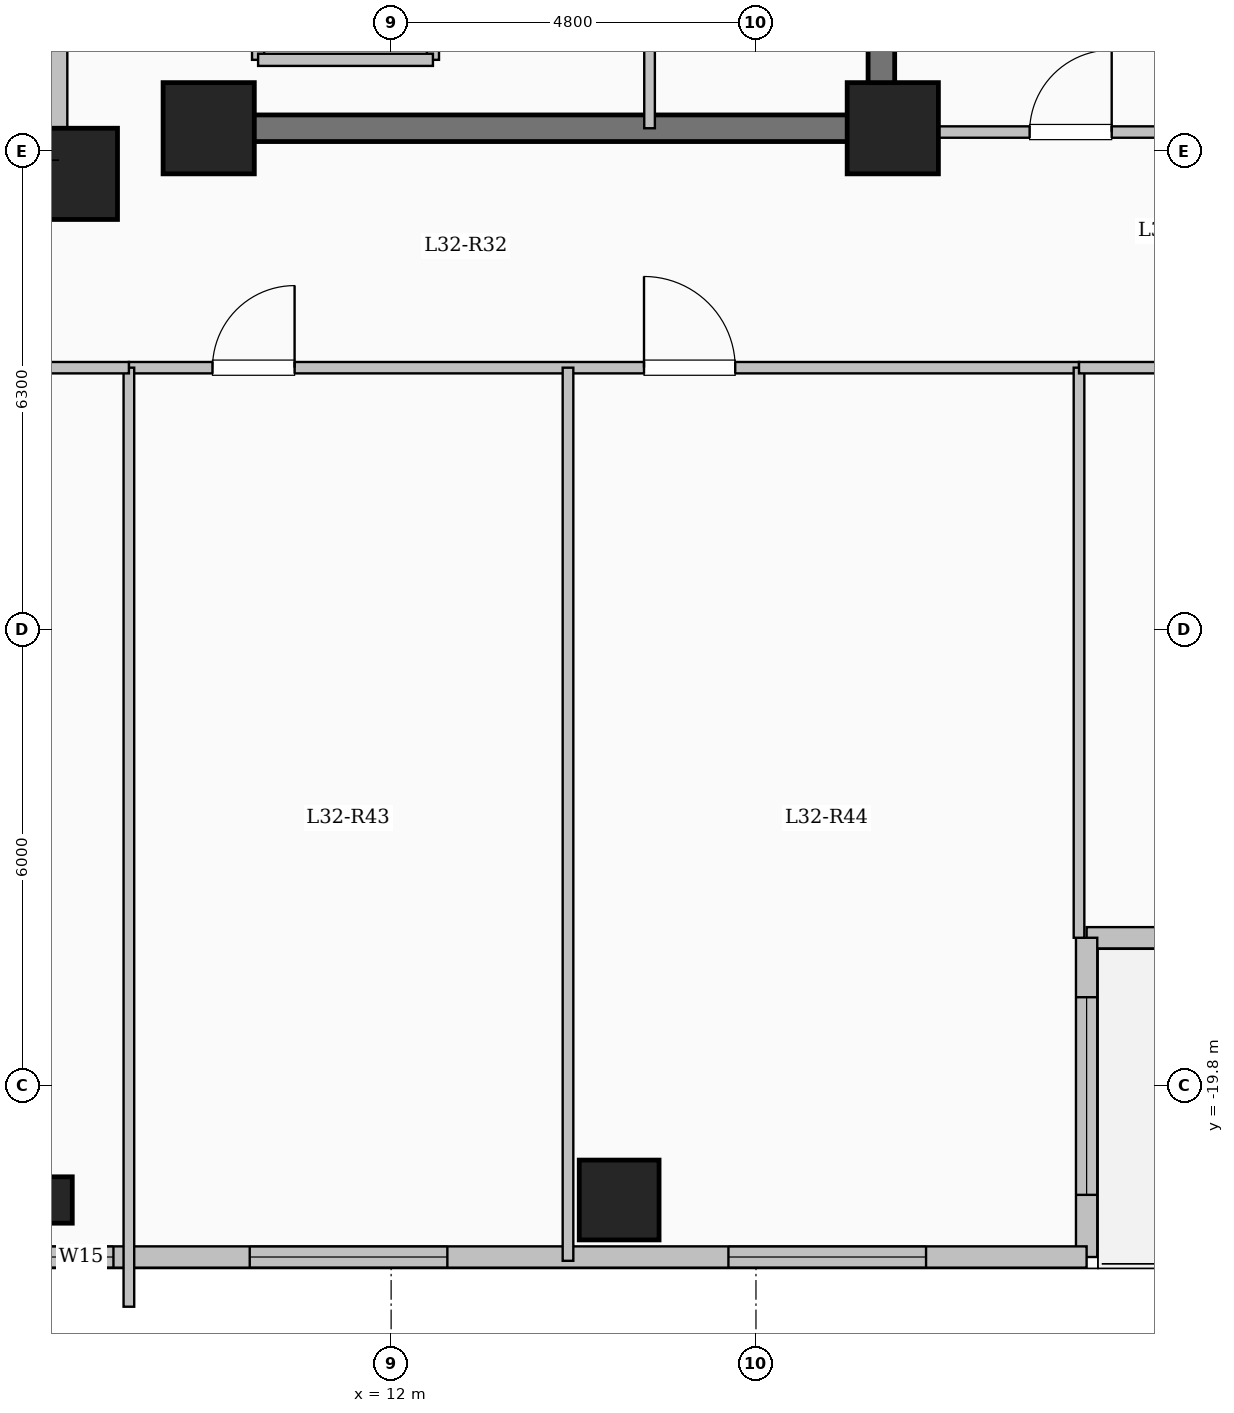
"""IFC4 building model, lengths in metres.
Left out: names, types, materials, properties, quantities, classifications, styles, units other than length and angle.
Written with IfcOpenShell. Run it as: python <this file> out.ifc"""

import sys

from ifc_helpers import new_model, si_unit, direction, frame, frame_2d, origin, origin_2d, place, context, subcontext, project, spatial, rectangle, hollow_circle, extrude, element, fill, save


model = new_model("IFC4")
c1 = context("Model", 3, precision=1e-05, world=origin(), true_north=direction((0.0, 1.0)))
c2 = subcontext(c1, "Body", "Model", "MODEL_VIEW")
j1 = project(units=[si_unit("LENGTHUNIT", "METRE"), si_unit("PLANEANGLEUNIT", "RADIAN")], contexts=[c1])
p1 = place(None, origin())
s1 = spatial("IfcSite", under=j1, at=p1, CompositionType="ELEMENT")
p2 = place(p1, origin())
s2 = spatial("IfcBuilding", under=s1, at=p2, CompositionType="ELEMENT")
p3 = place(p2, frame((0.0, 0.0, 118.5)))
s3 = spatial("IfcBuildingStorey", under=s2, at=p3, CompositionType="ELEMENT", Elevation=118.5)
for number, where, z_axis, x_axis in (
    (1, (7.8, -7.8, 0.0), (0.0, 0.0, 1.0), (1.0, 0.0, 0.0)),
    (2, (9.6, -7.2, 0.0), (0.0, 0.0, 1.0), (1.0, 0.0, 0.0)),
    (3, (18.6, -7.2, 0.0), (0.0, 0.0, 1.0), (1.0, 0.0, 0.0)),
):
    element("IfcColumn", number, at=place(p3, frame(where, z_axis=z_axis, x_axis=x_axis)), inside=s3, PredefinedType="COLUMN", context=c2, shape_type="SweptSolid", body=[
        extrude(rectangle(XDim=1.2, YDim=1.2, at=origin_2d()), origin(), (0.0, 0.0, 1.0), 4.5),
    ])
p4 = place(p3, frame((7.5, -21.3, 0.0), z_axis=(0.0, 0.0, 1.0), x_axis=(1.0, 0.0, 0.0)))
e4 = element("IfcColumn", 4, at=p4, inside=s3, PredefinedType="COLUMN", context=c2, shape_type="SweptSolid", body=[
    extrude(hollow_circle(Radius=0.305, WallThickness=0.025, at=origin_2d()), origin(), (0.0, 0.0, 1.0), 4.5),
])
p5 = place(p3, frame((15.0, -21.3, 0.0), z_axis=(0.0, 0.0, 1.0), x_axis=(1.0, 0.0, 0.0)))
e5 = element("IfcColumn", 5, at=p5, inside=s3, PredefinedType="COLUMN", context=c2, shape_type="SweptSolid", body=[
    extrude(rectangle(XDim=1.05, YDim=1.05, at=origin_2d()), origin(), (0.0, 0.0, 1.0), 4.5),
])
p6 = place(p3, frame((7.62, -7.62, 0.0), z_axis=(0.0, 0.0, 1.0), x_axis=(0.0, 1.0, 0.0)))
e6 = element("IfcWall", 6, at=p6, inside=s3, PredefinedType="SOLIDWALL", context=c2, shape_type="SweptSolid", body=[
    extrude(rectangle(XDim=15.24, YDim=0.24, at=frame_2d((7.62, 0.0))), origin(), (0.0, 0.0, 1.0), 4.2),
])
p7 = place(p6, frame((6.92, 0.0, 0.95)))
e7 = element("IfcOpeningElement", 7, at=p7, cuts=e6, PredefinedType="OPENING", context=c2, shape_type="SweptSolid", body=[
    extrude(rectangle(XDim=1.4, YDim=1.5, at=frame_2d((0.7, 0.75))), frame((0.0, 0.13, 0.0), z_axis=(0.0, -1.0, 0.0), x_axis=(1.0, 0.0, 0.0)), (0.0, 0.0, 1.0), 0.26),
])
p8 = place(p3, frame((26.85, -17.85, 0.0), z_axis=(0.0, 0.0, 1.0), x_axis=(-1.0, 0.0, 0.0)))
e8 = element("IfcWall", 8, at=p8, inside=s3, PredefinedType="SOLIDWALL", context=c2, shape_type="SweptSolid", body=[
    extrude(rectangle(XDim=5.7, YDim=0.28, at=frame_2d((2.85, 0.0))), origin(), (0.0, 0.0, 1.0), 4.2),
])
p9 = place(p8, frame((2.5, 0.0, 0.0)))
e9 = element("IfcOpeningElement", 9, at=p9, cuts=e8, PredefinedType="OPENING", context=c2, shape_type="SweptSolid", body=[
    extrude(rectangle(XDim=1.1, YDim=2.2, at=frame_2d((0.55, 1.1))), frame((0.0, 0.15, 0.0), z_axis=(0.0, -1.0, 0.0), x_axis=(1.0, 0.0, 0.0)), (0.0, 0.0, 1.0), 0.3),
])
p10 = place(p8, frame((0.755, 0.0, 0.95)))
e10 = element("IfcOpeningElement", 10, at=p10, cuts=e8, PredefinedType="OPENING", context=c2, shape_type="SweptSolid", body=[
    extrude(rectangle(XDim=1.2, YDim=1.5, at=frame_2d((0.6, 0.75))), frame((0.0, 0.15, 0.0), z_axis=(0.0, -1.0, 0.0), x_axis=(1.0, 0.0, 0.0)), (0.0, 0.0, 1.0), 0.3),
])
p11 = place(p3, frame((21.15, -17.85, 0.0), z_axis=(0.0, 0.0, 1.0), x_axis=(0.0, -1.0, 0.0)))
e11 = element("IfcWall", 11, at=p11, inside=s3, PredefinedType="SOLIDWALL", context=c2, shape_type="SweptSolid", body=[
    extrude(rectangle(XDim=4.2, YDim=0.28, at=frame_2d((2.1, 0.0))), origin(), (0.0, 0.0, 1.0), 4.2),
])
p12 = place(p11, frame((0.782, 0.0, 0.85)))
e12 = element("IfcOpeningElement", 12, at=p12, cuts=e11, PredefinedType="OPENING", context=c2, shape_type="SweptSolid", body=[
    extrude(rectangle(XDim=2.6, YDim=2.4, at=frame_2d((1.3, 1.2))), frame((0.0, 0.15, 0.0), z_axis=(0.0, -1.0, 0.0), x_axis=(1.0, 0.0, 0.0)), (0.0, 0.0, 1.0), 0.3),
])
p13 = place(p3, frame((21.15, -22.05, 0.0), z_axis=(0.0, 0.0, 1.0), x_axis=(-1.0, 0.0, 0.0)))
e13 = element("IfcWall", 13, at=p13, inside=s3, PredefinedType="SOLIDWALL", context=c2, shape_type="SweptSolid", body=[
    extrude(rectangle(XDim=13.8, YDim=0.28, at=frame_2d((6.9, 0.0))), origin(), (0.0, 0.0, 1.0), 4.2),
])
p14 = place(p13, frame((2.112, 0.0, 0.85)))
e14 = element("IfcOpeningElement", 14, at=p14, cuts=e13, PredefinedType="OPENING", context=c2, shape_type="SweptSolid", body=[
    extrude(rectangle(XDim=2.6, YDim=2.4, at=frame_2d((1.3, 1.2))), frame((0.0, 0.15, 0.0), z_axis=(0.0, -1.0, 0.0), x_axis=(1.0, 0.0, 0.0)), (0.0, 0.0, 1.0), 0.3),
])
p15 = place(p13, frame((8.41, 0.0, 0.85)))
e15 = element("IfcOpeningElement", 15, at=p15, cuts=e13, PredefinedType="OPENING", context=c2, shape_type="SweptSolid", body=[
    extrude(rectangle(XDim=2.6, YDim=2.4, at=frame_2d((1.3, 1.2))), frame((0.0, 0.15, 0.0), z_axis=(0.0, -1.0, 0.0), x_axis=(1.0, 0.0, 0.0)), (0.0, 0.0, 1.0), 0.3),
])
p16 = place(p13, frame((12.803, 0.0, 0.95)))
e16 = element("IfcOpeningElement", 16, at=p16, cuts=e13, PredefinedType="OPENING", context=c2, shape_type="SweptSolid", body=[
    extrude(rectangle(XDim=0.85, YDim=1.5, at=frame_2d((0.425, 0.75))), frame((0.0, 0.15, 0.0), z_axis=(0.0, -1.0, 0.0), x_axis=(1.0, 0.0, 0.0)), (0.0, 0.0, 1.0), 0.3),
])
p17 = place(p3, frame((10.25, -6.3, 0.0), z_axis=(0.0, 0.0, 1.0), x_axis=(0.0, 1.0, 0.0)))
e17 = element("IfcWall", 17, at=p17, inside=s3, PredefinedType="SOLIDWALL", context=c2, shape_type="SweptSolid", body=[
    extrude(rectangle(XDim=2.6, YDim=0.16, at=frame_2d((1.3, 0.0))), origin(), (0.0, 0.0, 1.0), 4.2),
])
p18 = place(p17, frame((0.75, 0.0, 0.0)))
e18 = element("IfcOpeningElement", 18, at=p18, cuts=e17, PredefinedType="OPENING", context=c2, shape_type="SweptSolid", body=[
    extrude(rectangle(XDim=1.1, YDim=2.15, at=frame_2d((0.55, 1.075))), frame((0.0, 0.09, 0.0), z_axis=(0.0, -1.0, 0.0), x_axis=(1.0, 0.0, 0.0)), (0.0, 0.0, 1.0), 0.18),
])
p19 = place(p3, frame((12.55, -6.3, 0.0), z_axis=(0.0, 0.0, 1.0), x_axis=(0.0, 1.0, 0.0)))
e19 = element("IfcWall", 19, at=p19, inside=s3, PredefinedType="SOLIDWALL", context=c2, shape_type="SweptSolid", body=[
    extrude(rectangle(XDim=2.6, YDim=0.16, at=frame_2d((1.3, 0.0))), origin(), (0.0, 0.0, 1.0), 4.2),
])
p20 = place(p3, frame((10.25, -6.3, 0.0), z_axis=(0.0, 0.0, 1.0), x_axis=(1.0, 0.0, 0.0)))
e20 = element("IfcWall", 20, at=p20, inside=s3, PredefinedType="SOLIDWALL", context=c2, shape_type="SweptSolid", body=[
    extrude(rectangle(XDim=2.3, YDim=0.16, at=frame_2d((1.15, 0.0))), origin(), (0.0, 0.0, 1.0), 4.2),
])
p21 = place(p3, frame((18.45, -7.375, 0.0), z_axis=(0.0, 0.0, 1.0), x_axis=(0.0, 1.0, 0.0)))
e21 = element("IfcWall", 21, at=p21, inside=s3, PredefinedType="SHEAR", context=c2, shape_type="SweptSolid", body=[
    extrude(rectangle(XDim=14.05, YDim=0.35, at=frame_2d((7.025, 0.0))), origin(), (0.0, 0.0, 1.0), 4.5),
])
p22 = place(p3, frame((10.075, -7.2, 0.0), z_axis=(0.0, 0.0, 1.0), x_axis=(1.0, 0.0, 0.0)))
e22 = element("IfcWall", 22, at=p22, inside=s3, PredefinedType="SHEAR", context=c2, shape_type="SweptSolid", body=[
    extrude(rectangle(XDim=8.55, YDim=0.35, at=frame_2d((4.275, 0.0))), origin(), (0.0, 0.0, 1.0), 4.5),
])
p23 = place(p3, frame((15.4, -7.2, 0.0), z_axis=(0.0, 0.0, 1.0), x_axis=(0.0, 1.0, 0.0)))
e23 = element("IfcWall", 23, at=p23, inside=s3, PredefinedType="PARTITIONING", context=c2, shape_type="SweptSolid", body=[
    extrude(rectangle(XDim=10.45, YDim=0.14, at=frame_2d((5.225, 0.0))), origin(), (0.0, 0.0, 1.0), 4.2),
])
p24 = place(p23, frame((9.25, 0.0, 0.0)))
e24 = element("IfcOpeningElement", 24, at=p24, cuts=e23, PredefinedType="OPENING", context=c2, shape_type="SweptSolid", body=[
    extrude(rectangle(XDim=0.9, YDim=2.08, at=frame_2d((0.45, 1.04))), frame((0.0, 0.08, 0.0), z_axis=(0.0, -1.0, 0.0), x_axis=(1.0, 0.0, 0.0)), (0.0, 0.0, 1.0), 0.16),
])
p25 = place(p3, frame((8.55, -10.35, 0.0), z_axis=(0.0, 0.0, 1.0), x_axis=(1.0, 0.0, 0.0)))
e25 = element("IfcWall", 25, at=p25, inside=s3, PredefinedType="PARTITIONING", context=c2, shape_type="SweptSolid", body=[
    extrude(rectangle(XDim=12.5, YDim=0.15, at=frame_2d((6.25, 0.0))), origin(), (0.0, 0.0, 1.0), 4.2),
])
p26 = place(p25, frame((1.1, 0.0, 0.0)))
e26 = element("IfcOpeningElement", 26, at=p26, cuts=e25, PredefinedType="OPENING", context=c2, shape_type="SweptSolid", body=[
    extrude(rectangle(XDim=1.08, YDim=2.15, at=frame_2d((0.54, 1.075))), frame((0.0, 0.085, 0.0), z_axis=(0.0, -1.0, 0.0), x_axis=(1.0, 0.0, 0.0)), (0.0, 0.0, 1.0), 0.17),
])
p27 = place(p25, frame((6.777, 0.0, 0.0)))
e27 = element("IfcOpeningElement", 27, at=p27, cuts=e25, PredefinedType="OPENING", context=c2, shape_type="SweptSolid", body=[
    extrude(rectangle(XDim=1.2, YDim=2.15, at=frame_2d((0.6, 1.075))), frame((0.0, 0.085, 0.0), z_axis=(0.0, -1.0, 0.0), x_axis=(1.0, 0.0, 0.0)), (0.0, 0.0, 1.0), 0.17),
])
p28 = place(p3, frame((8.55, -22.704, 0.0), z_axis=(0.0, 0.0, 1.0), x_axis=(0.0, 1.0, 0.0)))
e28 = element("IfcWall", 28, at=p28, inside=s3, PredefinedType="PARTITIONING", context=c2, shape_type="SweptSolid", body=[
    extrude(rectangle(XDim=12.354, YDim=0.14, at=frame_2d((6.177, 0.0))), origin(), (0.0, 0.0, 1.0), 4.2),
])
p29 = place(p3, frame((14.327, -22.1, 0.0), z_axis=(0.0, 0.0, 1.0), x_axis=(0.0, 1.0, 0.0)))
e29 = element("IfcWall", 29, at=p29, inside=s3, PredefinedType="PARTITIONING", context=c2, shape_type="SweptSolid", body=[
    extrude(rectangle(XDim=11.75, YDim=0.14, at=frame_2d((5.875, 0.0))), origin(), (0.0, 0.0, 1.0), 4.2),
])
p30 = place(p3, frame((-8.55, -10.35, 0.0), z_axis=(0.0, 0.0, 1.0), x_axis=(1.0, 0.0, 0.0)))
e30 = element("IfcWall", 30, at=p30, inside=s3, PredefinedType="PARTITIONING", context=c2, shape_type="SweptSolid", body=[
    extrude(rectangle(XDim=17.1, YDim=0.15, at=frame_2d((8.55, 0.0))), origin(), (0.0, 0.0, 1.0), 4.2),
])
p31 = place(p30, frame((1.4, 0.0, 0.0)))
e31 = element("IfcOpeningElement", 31, at=p31, cuts=e30, PredefinedType="OPENING", context=c2, shape_type="SweptSolid", body=[
    extrude(rectangle(XDim=1.2, YDim=2.15, at=frame_2d((0.6, 1.075))), frame((0.0, 0.085, 0.0), z_axis=(0.0, -1.0, 0.0), x_axis=(1.0, 0.0, 0.0)), (0.0, 0.0, 1.0), 0.17),
])
p32 = place(p3, frame((18.45, -7.25, 0.0), z_axis=(0.0, 0.0, 1.0), x_axis=(1.0, 0.0, 0.0)))
e32 = element("IfcWall", 32, at=p32, inside=s3, PredefinedType="PARTITIONING", context=c2, shape_type="SweptSolid", body=[
    extrude(rectangle(XDim=8.43, YDim=0.15, at=frame_2d((4.215, 0.0))), origin(), (0.0, 0.0, 1.0), 4.2),
])
p33 = place(p32, frame((1.95, 0.0, 0.0)))
e33 = element("IfcOpeningElement", 33, at=p33, cuts=e32, PredefinedType="OPENING", context=c2, shape_type="SweptSolid", body=[
    extrude(rectangle(XDim=1.08, YDim=2.15, at=frame_2d((0.54, 1.075))), frame((0.0, 0.085, 0.0), z_axis=(0.0, -1.0, 0.0), x_axis=(1.0, 0.0, 0.0)), (0.0, 0.0, 1.0), 0.17),
])
p34 = place(p3, frame((21.05, -17.85, 0.0), z_axis=(0.0, 0.0, 1.0), x_axis=(0.0, 1.0, 0.0)))
e34 = element("IfcWall", 34, at=p34, inside=s3, PredefinedType="PARTITIONING", context=c2, shape_type="SweptSolid", body=[
    extrude(rectangle(XDim=7.5, YDim=0.14, at=frame_2d((3.75, 0.0))), origin(), (0.0, 0.0, 1.0), 4.2),
])
p35 = place(p3, frame((21.05, -10.35, 0.0), z_axis=(0.0, 0.0, 1.0), x_axis=(1.0, 0.0, 0.0)))
e35 = element("IfcWall", 35, at=p35, inside=s3, PredefinedType="PARTITIONING", context=c2, shape_type="SweptSolid", body=[
    extrude(rectangle(XDim=5.83, YDim=0.15, at=frame_2d((2.915, 0.0))), origin(), (0.0, 0.0, 1.0), 4.2),
])
p36 = place(p35, frame((2.44, 0.0, 0.0)))
e36 = element("IfcOpeningElement", 36, at=p36, cuts=e35, PredefinedType="OPENING", context=c2, shape_type="SweptSolid", body=[
    extrude(rectangle(XDim=0.95, YDim=2.15, at=frame_2d((0.475, 1.075))), frame((0.0, 0.085, 0.0), z_axis=(0.0, -1.0, 0.0), x_axis=(1.0, 0.0, 0.0)), (0.0, 0.0, 1.0), 0.17),
])
p37 = place(p12, origin())
e37 = element("IfcWindow", 37, at=p37, inside=s3, PartitioningType="SINGLE_PANEL", PredefinedType="WINDOW", context=c2, shape_type="SweptSolid", body=[
    extrude(rectangle(XDim=2.6, YDim=2.4, at=frame_2d((1.3, 1.2))), frame((0.0, 0.03, 0.0), z_axis=(0.0, -1.0, 0.0), x_axis=(1.0, 0.0, 0.0)), (0.0, 0.0, 1.0), 0.06),
])
fill(e12, e37)
p38 = place(p14, origin())
e38 = element("IfcWindow", 38, at=p38, inside=s3, PartitioningType="SINGLE_PANEL", PredefinedType="WINDOW", context=c2, shape_type="SweptSolid", body=[
    extrude(rectangle(XDim=2.6, YDim=2.4, at=frame_2d((1.3, 1.2))), frame((0.0, 0.03, 0.0), z_axis=(0.0, -1.0, 0.0), x_axis=(1.0, 0.0, 0.0)), (0.0, 0.0, 1.0), 0.06),
])
fill(e14, e38)
p39 = place(p15, origin())
e39 = element("IfcWindow", 39, at=p39, inside=s3, PartitioningType="SINGLE_PANEL", PredefinedType="WINDOW", context=c2, shape_type="SweptSolid", body=[
    extrude(rectangle(XDim=2.6, YDim=2.4, at=frame_2d((1.3, 1.2))), frame((0.0, 0.03, 0.0), z_axis=(0.0, -1.0, 0.0), x_axis=(1.0, 0.0, 0.0)), (0.0, 0.0, 1.0), 0.06),
])
fill(e15, e39)
p40 = place(p16, origin())
e40 = element("IfcWindow", 40, at=p40, inside=s3, PartitioningType="SINGLE_PANEL", PredefinedType="WINDOW", context=c2, shape_type="SweptSolid", body=[
    extrude(rectangle(XDim=0.85, YDim=1.5, at=frame_2d((0.425, 0.75))), frame((0.0, 0.03, 0.0), z_axis=(0.0, -1.0, 0.0), x_axis=(1.0, 0.0, 0.0)), (0.0, 0.0, 1.0), 0.06),
])
fill(e16, e40)
p41 = place(p26, origin())
e41 = element("IfcDoor", 41, at=p41, inside=s3, OperationType="SINGLE_SWING_RIGHT", PredefinedType="DOOR", context=c2, shape_type="SweptSolid", body=[
    extrude(rectangle(XDim=1.08, YDim=2.15, at=frame_2d((0.54, 1.075))), frame((0.0, 0.025, 0.0), z_axis=(0.0, -1.0, 0.0), x_axis=(1.0, 0.0, 0.0)), (0.0, 0.0, 1.0), 0.05),
])
fill(e26, e41)
p42 = place(p27, origin())
e42 = element("IfcDoor", 42, at=p42, inside=s3, OperationType="SINGLE_SWING_LEFT", PredefinedType="DOOR", context=c2, shape_type="SweptSolid", body=[
    extrude(rectangle(XDim=1.2, YDim=2.15, at=frame_2d((0.6, 1.075))), frame((0.0, 0.025, 0.0), z_axis=(0.0, -1.0, 0.0), x_axis=(1.0, 0.0, 0.0)), (0.0, 0.0, 1.0), 0.05),
])
fill(e27, e42)
p43 = place(p33, origin())
e43 = element("IfcDoor", 43, at=p43, inside=s3, OperationType="SINGLE_SWING_RIGHT", PredefinedType="DOOR", context=c2, shape_type="SweptSolid", body=[
    extrude(rectangle(XDim=1.08, YDim=2.15, at=frame_2d((0.54, 1.075))), frame((0.0, 0.025, 0.0), z_axis=(0.0, -1.0, 0.0), x_axis=(1.0, 0.0, 0.0)), (0.0, 0.0, 1.0), 0.05),
])
fill(e33, e43)
save(model, sys.argv[1])
